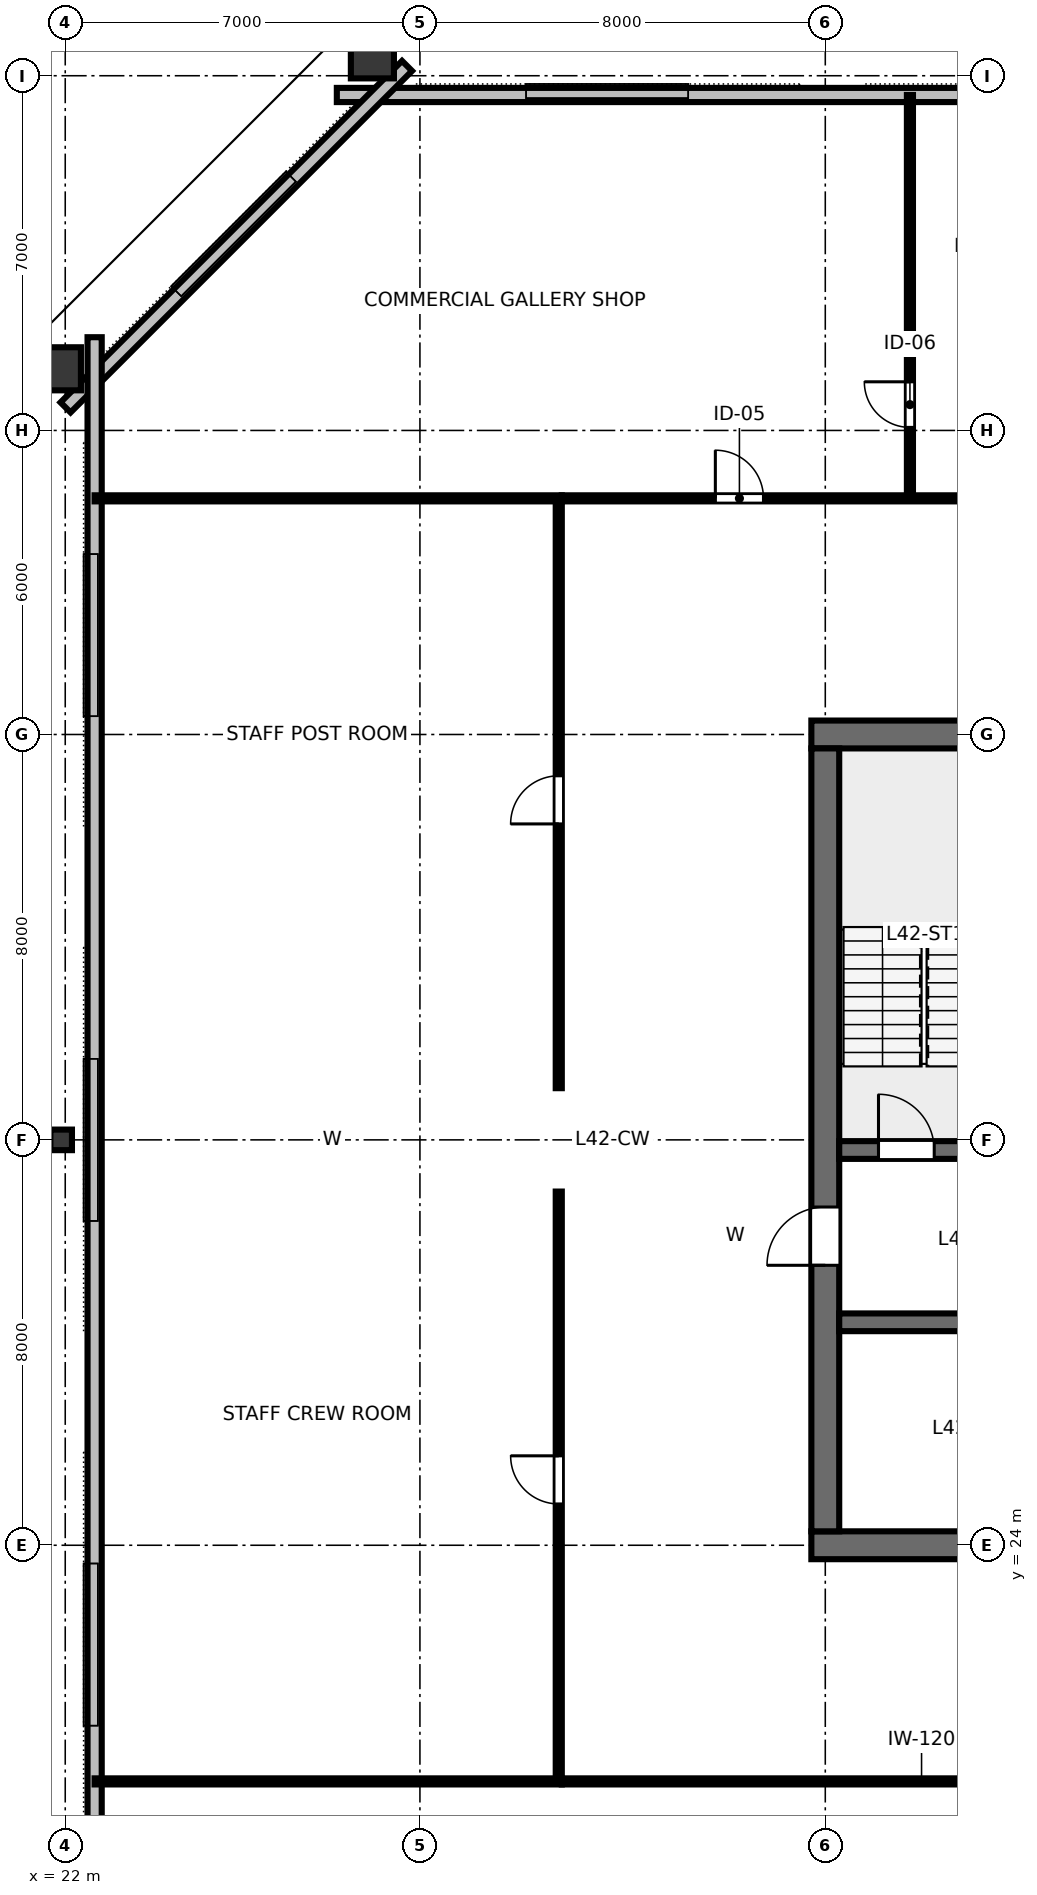
"""IFC4 building model, lengths in metres.
Left out: names, types, materials, properties, quantities, classifications, styles, units other than length and angle.
Written with IfcOpenShell. Run it as: python <this file> out.ifc"""

import sys

from ifc_helpers import new_model, si_unit, direction, frame, frame_2d, origin, origin_2d, place, context, subcontext, project, spatial, rectangle, hollow_rectangle, i_section, extrude, element, fill, save


model = new_model("IFC4")
c1 = context("Model", 3, precision=1e-05, world=origin(), true_north=direction((0.0, 1.0)))
c2 = subcontext(c1, "Body", "Model", "MODEL_VIEW")
j1 = project(units=[si_unit("LENGTHUNIT", "METRE"), si_unit("PLANEANGLEUNIT", "RADIAN")], contexts=[c1])
p1 = place(None, origin())
s1 = spatial("IfcSite", under=j1, at=p1, CompositionType="ELEMENT")
p2 = place(p1, origin())
s2 = spatial("IfcBuilding", under=s1, at=p2, CompositionType="ELEMENT")
p3 = place(p2, frame((0.0, 0.0, 160.0)))
s3 = spatial("IfcBuildingStorey", under=s2, at=p3, CompositionType="ELEMENT", Elevation=160.0)
p4 = place(p3, frame((36.725, 24.0, 0.0), z_axis=(0.0, 0.0, 1.0), x_axis=(1.0, 0.0, 0.0)))
e1 = element("IfcWall", 1, at=p4, inside=s3, PredefinedType="SHEAR", context=c2, shape_type="SweptSolid", body=[
    extrude(rectangle(XDim=18.55, YDim=0.55, at=frame_2d((9.275, 0.0))), origin(), (0.0, 0.0, 1.0), 3.36),
])
p5 = place(p4, frame((8.275, 0.0, 0.0)))
e2 = element("IfcOpeningElement", 2, at=p5, cuts=e1, PredefinedType="OPENING", context=c2, shape_type="SweptSolid", body=[
    extrude(rectangle(XDim=1.6, YDim=2.15, at=frame_2d((0.8, 1.075))), frame((0.0, 0.285, 0.0), z_axis=(0.0, -1.0, 0.0), x_axis=(1.0, 0.0, 0.0)), (0.0, 0.0, 1.0), 0.57),
])
p6 = place(p4, frame((13.675, 0.0, 0.0)))
e3 = element("IfcOpeningElement", 3, at=p6, cuts=e1, PredefinedType="OPENING", context=c2, shape_type="SweptSolid", body=[
    extrude(rectangle(XDim=1.6, YDim=2.15, at=frame_2d((0.8, 1.075))), frame((0.0, 0.285, 0.0), z_axis=(0.0, -1.0, 0.0), x_axis=(1.0, 0.0, 0.0)), (0.0, 0.0, 1.0), 0.57),
])
p7 = place(p3, frame((36.725, 40.0, 0.0), z_axis=(0.0, 0.0, 1.0), x_axis=(1.0, 0.0, 0.0)))
e4 = element("IfcWall", 4, at=p7, inside=s3, PredefinedType="SHEAR", context=c2, shape_type="SweptSolid", body=[
    extrude(rectangle(XDim=18.55, YDim=0.55, at=frame_2d((9.275, 0.0))), origin(), (0.0, 0.0, 1.0), 3.36),
])
p8 = place(p7, frame((8.775, 0.0, 0.0)))
e5 = element("IfcOpeningElement", 5, at=p8, cuts=e4, PredefinedType="OPENING", context=c2, shape_type="SweptSolid", body=[
    extrude(rectangle(XDim=1.0, YDim=2.15, at=frame_2d((0.5, 1.075))), frame((0.0, 0.285, 0.0), z_axis=(0.0, -1.0, 0.0), x_axis=(1.0, 0.0, 0.0)), (0.0, 0.0, 1.0), 0.57),
])
p9 = place(p3, frame((37.0, 24.275, 0.0), z_axis=(0.0, 0.0, 1.0), x_axis=(0.0, 1.0, 0.0)))
e6 = element("IfcWall", 6, at=p9, inside=s3, PredefinedType="SHEAR", context=c2, shape_type="SweptSolid", body=[
    extrude(rectangle(XDim=15.45, YDim=0.55, at=frame_2d((7.725, 0.0))), origin(), (0.0, 0.0, 1.0), 3.36),
])
p10 = place(p9, frame((5.25, 0.0, 0.0)))
e7 = element("IfcOpeningElement", 7, at=p10, cuts=e6, PredefinedType="OPENING", context=c2, shape_type="SweptSolid", body=[
    extrude(rectangle(XDim=1.15, YDim=2.15, at=frame_2d((0.575, 1.075))), frame((0.0, 0.285, 0.0), z_axis=(0.0, -1.0, 0.0), x_axis=(1.0, 0.0, 0.0)), (0.0, 0.0, 1.0), 0.57),
])
p11 = place(p3, frame((37.275, 31.8, 0.0), z_axis=(0.0, 0.0, 1.0), x_axis=(1.0, 0.0, 0.0)))
e8 = element("IfcWall", 8, at=p11, inside=s3, PredefinedType="SHEAR", context=c2, shape_type="SweptSolid", body=[
    extrude(rectangle(XDim=17.45, YDim=0.35, at=frame_2d((8.725, 0.0))), origin(), (0.0, 0.0, 1.0), 3.36),
])
p12 = place(p11, frame((0.775, 0.0, 0.0)))
e9 = element("IfcOpeningElement", 9, at=p12, cuts=e8, PredefinedType="OPENING", context=c2, shape_type="SweptSolid", body=[
    extrude(rectangle(XDim=1.1, YDim=2.15, at=frame_2d((0.55, 1.075))), frame((0.0, 0.185, 0.0), z_axis=(0.0, -1.0, 0.0), x_axis=(1.0, 0.0, 0.0)), (0.0, 0.0, 1.0), 0.37),
])
p13 = place(p11, frame((14.675, 0.0, 0.0)))
e10 = element("IfcOpeningElement", 10, at=p13, cuts=e8, PredefinedType="OPENING", context=c2, shape_type="SweptSolid", body=[
    extrude(rectangle(XDim=1.1, YDim=2.15, at=frame_2d((0.55, 1.075))), frame((0.0, 0.185, 0.0), z_axis=(0.0, -1.0, 0.0), x_axis=(1.0, 0.0, 0.0)), (0.0, 0.0, 1.0), 0.37),
])
p14 = place(p3, frame((37.275, 28.4, 0.0), z_axis=(0.0, 0.0, 1.0), x_axis=(1.0, 0.0, 0.0)))
e11 = element("IfcWall", 11, at=p14, inside=s3, PredefinedType="SHEAR", context=c2, shape_type="SweptSolid", body=[
    extrude(rectangle(XDim=17.45, YDim=0.35, at=frame_2d((8.725, 0.0))), origin(), (0.0, 0.0, 1.0), 3.36),
])
for number, where, z_axis, x_axis in (
    (12, (28.062, 53.448, 0.0), (0.0, 0.0, 1.0), (1.0, 0.0, 0.0)),
    (13, (21.81, 47.217, 0.0), (0.0, 0.0, 1.0), (0.0, 1.0, 0.0)),
):
    element("IfcColumn", number, at=place(p3, frame(where, z_axis=z_axis, x_axis=x_axis)), inside=s3, PredefinedType="COLUMN", context=c2, shape_type="SweptSolid", body=[
        extrude(hollow_rectangle(XDim=0.85, YDim=1.0, WallThickness=0.05, at=origin_2d()), origin(), (0.0, 0.0, 1.0), 3.358),
    ])
p15 = place(p3, frame((21.92, 32.0, 0.0), z_axis=(0.0, 0.0, 1.0), x_axis=(0.0, 1.0, 0.0)))
e14 = element("IfcColumn", 14, at=p15, inside=s3, PredefinedType="COLUMN", context=c2, shape_type="SweptSolid", body=[
    extrude(i_section(OverallWidth=0.406, OverallDepth=0.425, WebThickness=0.033, FlangeThickness=0.052, FilletRadius=0.025, at=origin_2d()), origin(), (0.0, 0.0, 1.0), 3.358),
])
p16 = place(p3, frame((64.64, 52.62, 0.0), z_axis=(0.0, 0.0, 1.0), x_axis=(-1.0, 0.0, 0.0)))
e15 = element("IfcWall", 15, at=p16, inside=s3, PredefinedType="STANDARD", context=c2, shape_type="SweptSolid", body=[
    extrude(rectangle(XDim=37.28, YDim=0.28, at=frame_2d((18.64, 0.0))), origin(), (0.0, 0.0, 1.0), 3.36),
])
p17 = place(p3, frame((28.746, 53.194, 0.0), z_axis=(0.0, 0.0, 1.0), x_axis=(-0.707119588888, -0.707093973253, 0.0)))
e16 = element("IfcWall", 16, at=p17, inside=s3, PredefinedType="STANDARD", context=c2, shape_type="SweptSolid", body=[
    extrude(rectangle(XDim=9.531, YDim=0.28, at=frame_2d((4.766, 0.0))), origin(), (0.0, 0.0, 1.0), 3.36),
])
p18 = place(p3, frame((22.58, 47.84, 0.0), z_axis=(0.0, 0.0, 1.0), x_axis=(0.0, -1.0, 0.0)))
e17 = element("IfcWall", 17, at=p18, inside=s3, PredefinedType="STANDARD", context=c2, shape_type="SweptSolid", body=[
    extrude(rectangle(XDim=31.68, YDim=0.28, at=frame_2d((15.84, 0.0))), origin(), (0.0, 0.0, 1.0), 3.36),
])
p19 = place(p3, frame((31.8, 19.34, 0.0), z_axis=(0.0, 0.0, 1.0), x_axis=(1.0, 0.0, 0.0)))
e18 = element("IfcWall", 18, at=p19, inside=s3, PredefinedType="PARTITIONING", context=c2, shape_type="SweptSolid", body=[
    extrude(rectangle(XDim=28.4, YDim=0.12, at=frame_2d((14.2, 0.0))), origin(), (0.0, 0.0, 1.0), 2.64),
])
p20 = place(p19, frame((13.725, 0.0, 0.0)))
e19 = element("IfcOpeningElement", 19, at=p20, cuts=e18, PredefinedType="OPENING", context=c2, shape_type="SweptSolid", body=[
    extrude(rectangle(XDim=0.95, YDim=2.15, at=frame_2d((0.475, 1.075))), frame((0.0, 0.07, 0.0), z_axis=(0.0, -1.0, 0.0), x_axis=(1.0, 0.0, 0.0)), (0.0, 0.0, 1.0), 0.14),
])
p21 = place(p3, frame((38.67, 44.66, 0.0), z_axis=(0.0, 0.0, 1.0), x_axis=(0.0, 1.0, 0.0)))
e20 = element("IfcWall", 20, at=p21, inside=s3, PredefinedType="PARTITIONING", context=c2, shape_type="SweptSolid", body=[
    extrude(rectangle(XDim=7.96, YDim=0.12, at=frame_2d((3.98, 0.0))), origin(), (0.0, 0.0, 1.0), 2.64),
])
p22 = place(p21, frame((1.4, 0.0, 0.0)))
e21 = element("IfcOpeningElement", 21, at=p22, cuts=e20, PredefinedType="OPENING", context=c2, shape_type="SweptSolid", body=[
    extrude(rectangle(XDim=0.9, YDim=2.15, at=frame_2d((0.45, 1.075))), frame((0.0, 0.07, 0.0), z_axis=(0.0, -1.0, 0.0), x_axis=(1.0, 0.0, 0.0)), (0.0, 0.0, 1.0), 0.14),
])
p23 = place(p3, frame((31.8, 44.66, 0.0), z_axis=(0.0, 0.0, 1.0), x_axis=(1.0, 0.0, 0.0)))
e22 = element("IfcWall", 22, at=p23, inside=s3, PredefinedType="PARTITIONING", context=c2, shape_type="SweptSolid", body=[
    extrude(rectangle(XDim=28.4, YDim=0.12, at=frame_2d((14.2, 0.0))), origin(), (0.0, 0.0, 1.0), 2.64),
])
p24 = place(p23, frame((3.03, 0.0, 0.0)))
e23 = element("IfcOpeningElement", 23, at=p24, cuts=e22, PredefinedType="OPENING", context=c2, shape_type="SweptSolid", body=[
    extrude(rectangle(XDim=0.95, YDim=2.15, at=frame_2d((0.475, 1.075))), frame((0.0, 0.07, 0.0), z_axis=(0.0, -1.0, 0.0), x_axis=(1.0, 0.0, 0.0)), (0.0, 0.0, 1.0), 0.14),
])
p25 = place(p23, frame((8.077, 0.0, 0.0)))
e24 = element("IfcOpeningElement", 24, at=p25, cuts=e22, PredefinedType="OPENING", context=c2, shape_type="SweptSolid", body=[
    extrude(rectangle(XDim=0.95, YDim=2.15, at=frame_2d((0.475, 1.075))), frame((0.0, 0.07, 0.0), z_axis=(0.0, -1.0, 0.0), x_axis=(1.0, 0.0, 0.0)), (0.0, 0.0, 1.0), 0.14),
])
p26 = place(p23, frame((12.396, 0.0, 0.0)))
e25 = element("IfcOpeningElement", 25, at=p26, cuts=e22, PredefinedType="OPENING", context=c2, shape_type="SweptSolid", body=[
    extrude(rectangle(XDim=0.95, YDim=2.15, at=frame_2d((0.475, 1.075))), frame((0.0, 0.07, 0.0), z_axis=(0.0, -1.0, 0.0), x_axis=(1.0, 0.0, 0.0)), (0.0, 0.0, 1.0), 0.14),
])
p27 = place(p23, frame((16.918, 0.0, 0.0)))
e26 = element("IfcOpeningElement", 26, at=p27, cuts=e22, PredefinedType="OPENING", context=c2, shape_type="SweptSolid", body=[
    extrude(rectangle(XDim=0.95, YDim=2.15, at=frame_2d((0.475, 1.075))), frame((0.0, 0.07, 0.0), z_axis=(0.0, -1.0, 0.0), x_axis=(1.0, 0.0, 0.0)), (0.0, 0.0, 1.0), 0.14),
])
p28 = place(p23, frame((23.295, 0.0, 0.0)))
e27 = element("IfcOpeningElement", 27, at=p28, cuts=e22, PredefinedType="OPENING", context=c2, shape_type="SweptSolid", body=[
    extrude(rectangle(XDim=0.95, YDim=2.15, at=frame_2d((0.475, 1.075))), frame((0.0, 0.07, 0.0), z_axis=(0.0, -1.0, 0.0), x_axis=(1.0, 0.0, 0.0)), (0.0, 0.0, 1.0), 0.14),
])
p29 = place(p3, frame((31.74, 19.4, 0.0), z_axis=(0.0, 0.0, 1.0), x_axis=(0.0, 1.0, 0.0)))
e28 = element("IfcWall", 28, at=p29, inside=s3, PredefinedType="PARTITIONING", context=c2, shape_type="SweptSolid", body=[
    extrude(rectangle(XDim=11.58, YDim=0.12, at=frame_2d((5.79, 0.0))), origin(), (0.0, 0.0, 1.0), 2.64),
])
p30 = place(p29, frame((5.415, 0.0, 0.0)))
e29 = element("IfcOpeningElement", 29, at=p30, cuts=e28, PredefinedType="OPENING", context=c2, shape_type="SweptSolid", body=[
    extrude(rectangle(XDim=0.95, YDim=2.15, at=frame_2d((0.475, 1.075))), frame((0.0, 0.07, 0.0), z_axis=(0.0, -1.0, 0.0), x_axis=(1.0, 0.0, 0.0)), (0.0, 0.0, 1.0), 0.14),
])
p31 = place(p3, frame((31.74, 33.02, 0.0), z_axis=(0.0, 0.0, 1.0), x_axis=(0.0, 1.0, 0.0)))
e30 = element("IfcWall", 30, at=p31, inside=s3, PredefinedType="PARTITIONING", context=c2, shape_type="SweptSolid", body=[
    extrude(rectangle(XDim=11.58, YDim=0.12, at=frame_2d((5.79, 0.0))), origin(), (0.0, 0.0, 1.0), 2.64),
])
p32 = place(p31, frame((5.215, 0.0, 0.0)))
e31 = element("IfcOpeningElement", 31, at=p32, cuts=e30, PredefinedType="OPENING", context=c2, shape_type="SweptSolid", body=[
    extrude(rectangle(XDim=0.95, YDim=2.15, at=frame_2d((0.475, 1.075))), frame((0.0, 0.07, 0.0), z_axis=(0.0, -1.0, 0.0), x_axis=(1.0, 0.0, 0.0)), (0.0, 0.0, 1.0), 0.14),
])
for number, where, z_axis, x_axis in (
    (32, (31.8, 19.34, 0.0), (0.0, 0.0, 1.0), (-1.0, 0.0, 0.0)),
    (33, (31.8, 44.66, 0.0), (0.0, 0.0, 1.0), (-1.0, 0.0, 0.0)),
):
    element("IfcWall", number, at=place(p3, frame(where, z_axis=z_axis, x_axis=x_axis)), inside=s3, PredefinedType="PARTITIONING", context=c2, shape_type="SweptSolid", body=[
        extrude(rectangle(XDim=9.22, YDim=0.12, at=frame_2d((4.61, 0.0))), origin(), (0.0, 0.0, 1.0), 2.64),
    ])
p33 = place(p12, origin())
e34 = element("IfcDoor", 34, at=p33, inside=s3, OperationType="SINGLE_SWING_LEFT", PredefinedType="DOOR", context=c2, shape_type="SweptSolid", body=[
    extrude(rectangle(XDim=1.1, YDim=2.15, at=frame_2d((0.55, 1.075))), frame((0.0, 0.025, 0.0), z_axis=(0.0, -1.0, 0.0), x_axis=(1.0, 0.0, 0.0)), (0.0, 0.0, 1.0), 0.05),
])
fill(e9, e34)
p34 = place(p10, origin())
e35 = element("IfcDoor", 35, at=p34, inside=s3, OperationType="SINGLE_SWING_LEFT", PredefinedType="DOOR", context=c2, shape_type="SweptSolid", body=[
    extrude(rectangle(XDim=1.15, YDim=2.15, at=frame_2d((0.575, 1.075))), frame((0.0, 0.025, 0.0), z_axis=(0.0, -1.0, 0.0), x_axis=(1.0, 0.0, 0.0)), (0.0, 0.0, 1.0), 0.05),
])
fill(e7, e35)
p35 = place(p22, origin())
e36 = element("IfcDoor", 36, at=p35, inside=s3, OperationType="SINGLE_SWING_RIGHT", PredefinedType="DOOR", context=c2, shape_type="SweptSolid", body=[
    extrude(rectangle(XDim=0.9, YDim=2.15, at=frame_2d((0.45, 1.075))), frame((0.0, 0.025, 0.0), z_axis=(0.0, -1.0, 0.0), x_axis=(1.0, 0.0, 0.0)), (0.0, 0.0, 1.0), 0.05),
])
fill(e21, e36)
p36 = place(p24, origin())
e37 = element("IfcDoor", 37, at=p36, inside=s3, OperationType="SINGLE_SWING_LEFT", PredefinedType="DOOR", context=c2, shape_type="SweptSolid", body=[
    extrude(rectangle(XDim=0.95, YDim=2.15, at=frame_2d((0.475, 1.075))), frame((0.0, 0.025, 0.0), z_axis=(0.0, -1.0, 0.0), x_axis=(1.0, 0.0, 0.0)), (0.0, 0.0, 1.0), 0.05),
])
fill(e23, e37)
p37 = place(p30, origin())
e38 = element("IfcDoor", 38, at=p37, inside=s3, OperationType="SINGLE_SWING_RIGHT", PredefinedType="DOOR", context=c2, shape_type="SweptSolid", body=[
    extrude(rectangle(XDim=0.95, YDim=2.15, at=frame_2d((0.475, 1.075))), frame((0.0, 0.025, 0.0), z_axis=(0.0, -1.0, 0.0), x_axis=(1.0, 0.0, 0.0)), (0.0, 0.0, 1.0), 0.05),
])
fill(e29, e38)
p38 = place(p32, origin())
e39 = element("IfcDoor", 39, at=p38, inside=s3, OperationType="SINGLE_SWING_LEFT", PredefinedType="DOOR", context=c2, shape_type="SweptSolid", body=[
    extrude(rectangle(XDim=0.95, YDim=2.15, at=frame_2d((0.475, 1.075))), frame((0.0, 0.025, 0.0), z_axis=(0.0, -1.0, 0.0), x_axis=(1.0, 0.0, 0.0)), (0.0, 0.0, 1.0), 0.05),
])
fill(e31, e39)
save(model, sys.argv[1])
